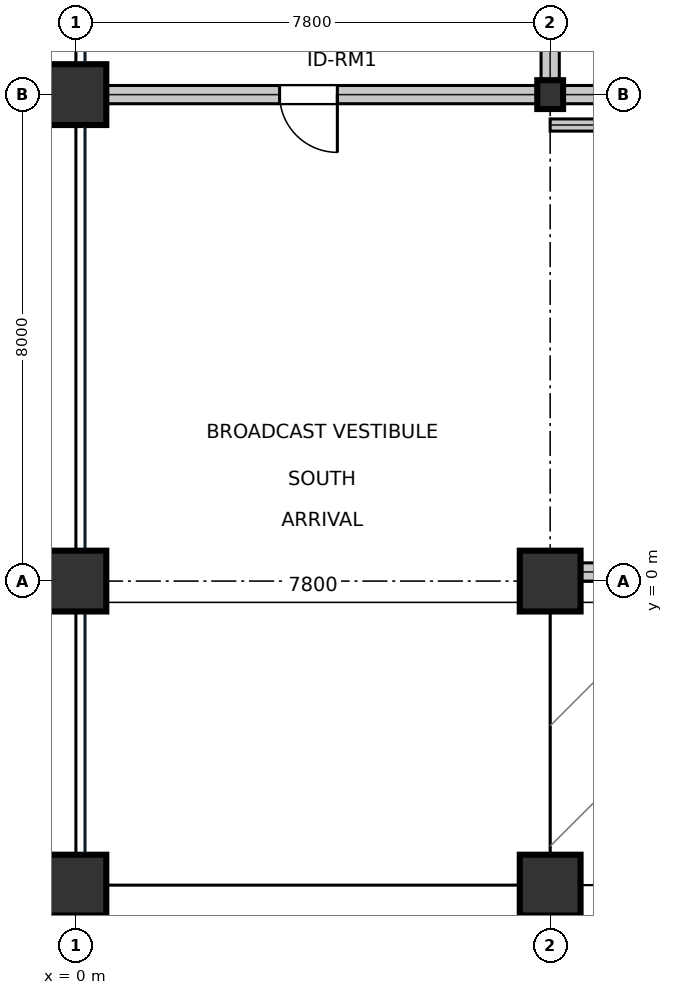
"""IFC4 building model, lengths in metres.
Left out: names, types, materials, properties, quantities, classifications, styles, units other than length and angle.
Written with IfcOpenShell. Run it as: python <this file> out.ifc"""

import sys

from ifc_helpers import new_model, si_unit, direction, frame, frame_2d, origin, origin_2d, place, context, subcontext, project, spatial, rectangle, i_section, extrude, element, fill, save


model = new_model("IFC4")
c1 = context("Model", 3, precision=1e-05, world=origin(), true_north=direction((0.0, 1.0)))
c2 = subcontext(c1, "Body", "Model", "MODEL_VIEW")
j1 = project(units=[si_unit("LENGTHUNIT", "METRE"), si_unit("PLANEANGLEUNIT", "RADIAN")], contexts=[c1])
p1 = place(None, origin())
s1 = spatial("IfcSite", under=j1, at=p1, CompositionType="ELEMENT")
p2 = place(p1, origin())
s2 = spatial("IfcBuilding", under=s1, at=p2, CompositionType="ELEMENT")
p3 = place(p2, origin())
s3 = spatial("IfcBuildingStorey", under=s2, at=p3, CompositionType="ELEMENT", Elevation=0.0)
for number, where, z_axis, x_axis in (
    (1, (0.0, -5.0, 0.0), (0.0, 0.0, 1.0), (1.0, 0.0, 0.0)),
    (2, (0.0, 0.0, 0.0), (0.0, 0.0, 1.0), (1.0, 0.0, 0.0)),
    (3, (0.0, 8.0, 0.0), (0.0, 0.0, 1.0), (1.0, 0.0, 0.0)),
    (4, (7.8, -5.0, 0.0), (0.0, 0.0, 1.0), (1.0, 0.0, 0.0)),
    (5, (7.8, 0.0, 0.0), (0.0, 0.0, 1.0), (1.0, 0.0, 0.0)),
):
    element("IfcColumn", number, at=place(p3, frame(where, z_axis=z_axis, x_axis=x_axis)), inside=s3, PredefinedType="COLUMN", context=c2, shape_type="SweptSolid", body=[
        extrude(rectangle(XDim=1.0, YDim=1.0, at=origin_2d()), origin(), (0.0, 0.0, 1.0), 5.395),
    ])
p4 = place(p3, frame((7.8, 8.0, 0.0), z_axis=(0.0, 0.0, 1.0), x_axis=(1.0, 0.0, 0.0)))
e6 = element("IfcColumn", 6, at=p4, inside=s3, PredefinedType="COLUMN", context=c2, shape_type="SweptSolid", body=[
    extrude(i_section(OverallWidth=0.424, OverallDepth=0.474, WebThickness=0.048, FlangeThickness=0.077, at=origin_2d()), origin(), (0.0, 0.0, 1.0), 5.395),
])
p5 = place(p3, frame((8.31, 0.15, 0.0), z_axis=(0.0, 0.0, 1.0), x_axis=(1.0, 0.0, 0.0)))
e7 = element("IfcWall", 7, at=p5, inside=s3, PredefinedType="STANDARD", context=c2, shape_type="SweptSolid", body=[
    extrude(rectangle(XDim=6.78, YDim=0.3, at=frame_2d((3.39, 0.0))), origin(), (0.0, 0.0, 1.0), 4.338),
])
p6 = place(p5, frame((0.3, 0.0, 0.0)))
e8 = element("IfcOpeningElement", 8, at=p6, cuts=e7, PredefinedType="OPENING", context=c2, shape_type="SweptSolid", body=[
    extrude(rectangle(XDim=6.2, YDim=2.8, at=frame_2d((3.1, 1.4))), frame((0.0, 0.16, 0.0), z_axis=(0.0, -1.0, 0.0), x_axis=(1.0, 0.0, 0.0)), (0.0, 0.0, 1.0), 0.32),
])
p7 = place(p3, frame((7.8, 8.0, 0.0), z_axis=(0.0, 0.0, 1.0), x_axis=(0.0, 1.0, 0.0)))
e9 = element("IfcWall", 9, at=p7, inside=s3, PredefinedType="PARTITIONING", context=c2, shape_type="SweptSolid", body=[
    extrude(rectangle(XDim=32.0, YDim=0.3, at=frame_2d((16.0, 0.0))), origin(), (0.0, 0.0, 1.0), 3.688),
])
p8 = place(p7, frame((28.5, 0.0, 0.0)))
e10 = element("IfcOpeningElement", 10, at=p8, cuts=e9, PredefinedType="OPENING", context=c2, shape_type="SweptSolid", body=[
    extrude(rectangle(XDim=1.05, YDim=2.15, at=frame_2d((0.525, 1.075))), frame((0.0, 0.16, 0.0), z_axis=(0.0, -1.0, 0.0), x_axis=(1.0, 0.0, 0.0)), (0.0, 0.0, 1.0), 0.32),
])
p9 = place(p3, frame((0.15, 8.0, 0.0), z_axis=(0.0, 0.0, 1.0), x_axis=(1.0, 0.0, 0.0)))
e11 = element("IfcWall", 11, at=p9, inside=s3, PredefinedType="PARTITIONING", context=c2, shape_type="SweptSolid", body=[
    extrude(rectangle(XDim=23.25, YDim=0.3, at=frame_2d((11.625, 0.0))), origin(), (0.0, 0.0, 1.0), 3.688),
])
p10 = place(p9, frame((3.2, 0.0, 0.0)))
e12 = element("IfcOpeningElement", 12, at=p10, cuts=e11, PredefinedType="OPENING", context=c2, shape_type="SweptSolid", body=[
    extrude(rectangle(XDim=0.95, YDim=2.15, at=frame_2d((0.475, 1.075))), frame((0.0, 0.16, 0.0), z_axis=(0.0, -1.0, 0.0), x_axis=(1.0, 0.0, 0.0)), (0.0, 0.0, 1.0), 0.32),
])
p11 = place(p3, frame((7.8, 7.5, 0.0), z_axis=(0.0, 0.0, 1.0), x_axis=(1.0, 0.0, 0.0)))
e13 = element("IfcWall", 13, at=p11, inside=s3, PredefinedType="SOLIDWALL", context=c2, shape_type="SweptSolid", body=[
    extrude(rectangle(XDim=26.7, YDim=0.2, at=frame_2d((13.35, 0.0))), origin(), (0.0, 0.0, 1.0), 4.415),
])
p12 = place(p10, frame((0.95, 0.0, 0.0), z_axis=(0.0, 0.0, 1.0), x_axis=(-1.0, 0.0, 0.0)))
e14 = element("IfcDoor", 14, at=p12, inside=s3, OperationType="SINGLE_SWING_LEFT", PredefinedType="DOOR", context=c2, shape_type="SweptSolid", body=[
    extrude(rectangle(XDim=0.95, YDim=2.15, at=frame_2d((0.475, 1.075))), frame((0.0, 0.025, 0.0), z_axis=(0.0, -1.0, 0.0), x_axis=(1.0, 0.0, 0.0)), (0.0, 0.0, 1.0), 0.05),
])
fill(e12, e14)
save(model, sys.argv[1])
